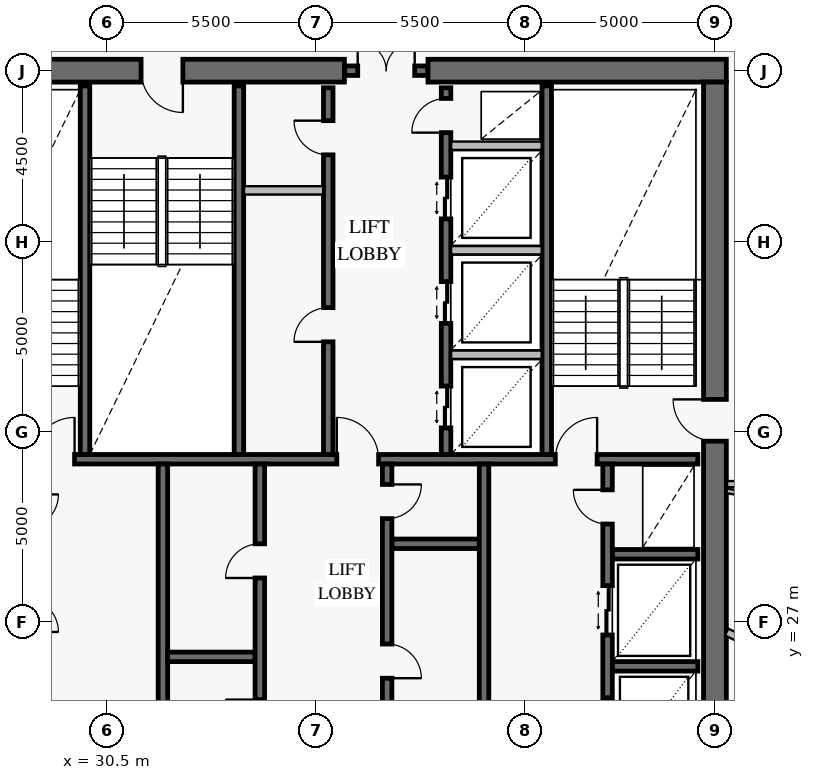
"""IFC4 building model, lengths in metres.
Left out: names, types, materials, properties, quantities, classifications, styles, units other than length and angle.
Written with IfcOpenShell. Run it as: python <this file> out.ifc"""

import sys

from ifc_helpers import new_model, si_unit, direction, frame, frame_2d, origin, place, context, subcontext, project, spatial, rectangle, extrude, element, fill, save


model = new_model("IFC4")
c1 = context("Model", 3, precision=1e-05, world=origin(), true_north=direction((0.0, 1.0)))
c2 = subcontext(c1, "Body", "Model", "MODEL_VIEW")
j1 = project(units=[si_unit("LENGTHUNIT", "METRE"), si_unit("PLANEANGLEUNIT", "RADIAN")], contexts=[c1])
p1 = place(None, origin())
s1 = spatial("IfcSite", under=j1, at=p1, CompositionType="ELEMENT")
p2 = place(p1, origin())
s2 = spatial("IfcBuilding", under=s1, at=p2, CompositionType="ELEMENT")
p3 = place(p2, frame((0.0, 0.0, 295.8)))
s3 = spatial("IfcBuildingStorey", under=s2, at=p3, CompositionType="ELEMENT", Elevation=295.8)
p4 = place(p3, frame((46.8, 41.5, 0.0), z_axis=(0.0, 0.0, 1.0), x_axis=(-1.0, 0.0, 0.0)))
e1 = element("IfcWall", 1, at=p4, inside=s3, PredefinedType="SHEAR", context=c2, shape_type="SweptSolid", body=[
    extrude(rectangle(XDim=7.85, YDim=0.6, at=frame_2d((3.925, 0.0))), origin(), (0.0, 0.0, 1.0), 3.8),
])
p5 = place(p3, frame((36.75, 41.5, 0.0), z_axis=(0.0, 0.0, 1.0), x_axis=(-1.0, 0.0, 0.0)))
e2 = element("IfcWall", 2, at=p5, inside=s3, PredefinedType="SHEAR", context=c2, shape_type="SweptSolid", body=[
    extrude(rectangle(XDim=11.55, YDim=0.6, at=frame_2d((5.775, 0.0))), origin(), (0.0, 0.0, 1.0), 3.8),
])
p6 = place(p5, frame((4.25, 0.0, 0.0)))
e3 = element("IfcOpeningElement", 3, at=p6, cuts=e2, PredefinedType="OPENING", context=c2, shape_type="SweptSolid", body=[
    extrude(rectangle(XDim=1.1, YDim=2.15, at=frame_2d((0.55, 1.075))), frame((0.0, 0.312, 0.0), z_axis=(0.0, -1.0, 0.0), x_axis=(1.0, 0.0, 0.0)), (0.0, 0.0, 1.0), 0.624),
])
p7 = place(p3, frame((46.5, 22.8, 0.0), z_axis=(0.0, 0.0, 1.0), x_axis=(0.0, 1.0, 0.0)))
e4 = element("IfcWall", 4, at=p7, inside=s3, PredefinedType="SHEAR", context=c2, shape_type="SweptSolid", body=[
    extrude(rectangle(XDim=18.4, YDim=0.6, at=frame_2d((9.2, 0.0))), origin(), (0.0, 0.0, 1.0), 3.8),
])
p8 = place(p7, frame((8.95, 0.0, 0.0)))
e5 = element("IfcOpeningElement", 5, at=p8, cuts=e4, PredefinedType="OPENING", context=c2, shape_type="SweptSolid", body=[
    extrude(rectangle(XDim=1.1, YDim=2.15, at=frame_2d((0.55, 1.075))), frame((0.0, 0.312, 0.0), z_axis=(0.0, -1.0, 0.0), x_axis=(1.0, 0.0, 0.0)), (0.0, 0.0, 1.0), 0.624),
])
p9 = place(p3, frame((36.76, 41.5, 0.0), z_axis=(0.0, 0.0, 1.0), x_axis=(1.0, 0.0, 0.0)))
e6 = element("IfcWall", 6, at=p9, inside=s3, PredefinedType="SOLIDWALL", context=c2, shape_type="SweptSolid", body=[
    extrude(rectangle(XDim=2.18, YDim=0.25, at=frame_2d((1.09, 0.0))), origin(), (0.0, 0.0, 1.0), 3.8),
])
p10 = place(p9, frame((0.34, 0.0, 0.0)))
e7 = element("IfcOpeningElement", 7, at=p10, cuts=e6, PredefinedType="OPENING", context=c2, shape_type="SweptSolid", body=[
    extrude(rectangle(XDim=1.5, YDim=2.15, at=frame_2d((0.75, 1.075))), frame((0.0, 0.137, 0.0), z_axis=(0.0, -1.0, 0.0), x_axis=(1.0, 0.0, 0.0)), (0.0, 0.0, 1.0), 0.274),
])
p11 = place(p3, frame((25.95, 31.275, 0.0), z_axis=(0.0, 0.0, 1.0), x_axis=(1.0, 0.0, 0.0)))
e8 = element("IfcWall", 8, at=p11, inside=s3, PredefinedType="SOLIDWALL", context=c2, shape_type="SweptSolid", body=[
    extrude(rectangle(XDim=20.1, YDim=0.25, at=frame_2d((10.05, 0.0))), origin(), (0.0, 0.0, 1.0), 3.8),
])
p12 = place(p11, frame((2.6, 0.0, 0.0)))
e9 = element("IfcOpeningElement", 9, at=p12, cuts=e8, PredefinedType="OPENING", context=c2, shape_type="SweptSolid", body=[
    extrude(rectangle(XDim=1.1, YDim=2.15, at=frame_2d((0.55, 1.075))), frame((0.0, 0.137, 0.0), z_axis=(0.0, -1.0, 0.0), x_axis=(1.0, 0.0, 0.0)), (0.0, 0.0, 1.0), 0.274),
])
p13 = place(p11, frame((10.6, 0.0, 0.0)))
e10 = element("IfcOpeningElement", 10, at=p13, cuts=e8, PredefinedType="OPENING", context=c2, shape_type="SweptSolid", body=[
    extrude(rectangle(XDim=1.1, YDim=2.15, at=frame_2d((0.55, 1.075))), frame((0.0, 0.137, 0.0), z_axis=(0.0, -1.0, 0.0), x_axis=(1.0, 0.0, 0.0)), (0.0, 0.0, 1.0), 0.274),
])
p14 = place(p11, frame((16.35, 0.0, 0.0)))
e11 = element("IfcOpeningElement", 11, at=p14, cuts=e8, PredefinedType="OPENING", context=c2, shape_type="SweptSolid", body=[
    extrude(rectangle(XDim=1.1, YDim=2.15, at=frame_2d((0.55, 1.075))), frame((0.0, 0.137, 0.0), z_axis=(0.0, -1.0, 0.0), x_axis=(1.0, 0.0, 0.0)), (0.0, 0.0, 1.0), 0.274),
])
for number, where, z_axis, x_axis in (
    (12, (29.925, 31.4, 0.0), (0.0, 0.0, 1.0), (0.0, 1.0, 0.0)),
    (13, (33.975, 31.4, 0.0), (0.0, 0.0, 1.0), (0.0, 1.0, 0.0)),
    (14, (42.075, 31.4, 0.0), (0.0, 0.0, 1.0), (0.0, 1.0, 0.0)),
):
    element("IfcWall", number, at=place(p3, frame(where, z_axis=z_axis, x_axis=x_axis)), inside=s3, PredefinedType="SOLIDWALL", context=c2, shape_type="SweptSolid", body=[
        extrude(rectangle(XDim=9.7, YDim=0.25, at=frame_2d((4.85, 0.0))), origin(), (0.0, 0.0, 1.0), 3.8),
    ])
p15 = place(p3, frame((36.325, 31.4, 0.0), z_axis=(0.0, 0.0, 1.0), x_axis=(0.0, 1.0, 0.0)))
e15 = element("IfcWall", 15, at=p15, inside=s3, PredefinedType="SOLIDWALL", context=c2, shape_type="SweptSolid", body=[
    extrude(rectangle(XDim=9.65, YDim=0.25, at=frame_2d((4.825, 0.0))), origin(), (0.0, 0.0, 1.0), 3.8),
])
p16 = place(p15, frame((2.965, 0.0, 0.0)))
e16 = element("IfcOpeningElement", 16, at=p16, cuts=e15, PredefinedType="OPENING", context=c2, shape_type="SweptSolid", body=[
    extrude(rectangle(XDim=0.9, YDim=2.1, at=frame_2d((0.45, 1.05))), frame((0.0, 0.137, 0.0), z_axis=(0.0, -1.0, 0.0), x_axis=(1.0, 0.0, 0.0)), (0.0, 0.0, 1.0), 0.274),
])
p17 = place(p15, frame((7.885, 0.0, 0.0)))
e17 = element("IfcOpeningElement", 17, at=p17, cuts=e15, PredefinedType="OPENING", context=c2, shape_type="SweptSolid", body=[
    extrude(rectangle(XDim=0.9, YDim=2.1, at=frame_2d((0.45, 1.05))), frame((0.0, 0.137, 0.0), z_axis=(0.0, -1.0, 0.0), x_axis=(1.0, 0.0, 0.0)), (0.0, 0.0, 1.0), 0.274),
])
p18 = place(p3, frame((39.425, 31.4, 0.0), z_axis=(0.0, 0.0, 1.0), x_axis=(0.0, 1.0, 0.0)))
e18 = element("IfcWall", 18, at=p18, inside=s3, PredefinedType="SOLIDWALL", context=c2, shape_type="SweptSolid", body=[
    extrude(rectangle(XDim=9.65, YDim=0.25, at=frame_2d((4.825, 0.0))), origin(), (0.0, 0.0, 1.0), 3.8),
])
p19 = place(p18, frame((0.7, 0.0, 0.0)))
e19 = element("IfcOpeningElement", 19, at=p19, cuts=e18, PredefinedType="OPENING", context=c2, shape_type="SweptSolid", body=[
    extrude(rectangle(XDim=1.1, YDim=2.2, at=frame_2d((0.55, 1.1))), frame((0.0, 0.137, 0.0), z_axis=(0.0, -1.0, 0.0), x_axis=(1.0, 0.0, 0.0)), (0.0, 0.0, 1.0), 0.274),
])
p20 = place(p18, frame((3.45, 0.0, 0.0)))
e20 = element("IfcOpeningElement", 20, at=p20, cuts=e18, PredefinedType="OPENING", context=c2, shape_type="SweptSolid", body=[
    extrude(rectangle(XDim=1.1, YDim=2.2, at=frame_2d((0.55, 1.1))), frame((0.0, 0.137, 0.0), z_axis=(0.0, -1.0, 0.0), x_axis=(1.0, 0.0, 0.0)), (0.0, 0.0, 1.0), 0.274),
])
p21 = place(p18, frame((6.2, 0.0, 0.0)))
e21 = element("IfcOpeningElement", 21, at=p21, cuts=e18, PredefinedType="OPENING", context=c2, shape_type="SweptSolid", body=[
    extrude(rectangle(XDim=1.1, YDim=2.2, at=frame_2d((0.55, 1.1))), frame((0.0, 0.137, 0.0), z_axis=(0.0, -1.0, 0.0), x_axis=(1.0, 0.0, 0.0)), (0.0, 0.0, 1.0), 0.274),
])
p22 = place(p18, frame((8.47, 0.0, 0.0)))
e22 = element("IfcOpeningElement", 22, at=p22, cuts=e18, PredefinedType="OPENING", context=c2, shape_type="SweptSolid", body=[
    extrude(rectangle(XDim=0.9, YDim=2.1, at=frame_2d((0.45, 1.05))), frame((0.0, 0.137, 0.0), z_axis=(0.0, -1.0, 0.0), x_axis=(1.0, 0.0, 0.0)), (0.0, 0.0, 1.0), 0.274),
])
p23 = place(p3, frame((31.975, 22.95, 0.0), z_axis=(0.0, 0.0, 1.0), x_axis=(0.0, 1.0, 0.0)))
e23 = element("IfcWall", 23, at=p23, inside=s3, PredefinedType="SOLIDWALL", context=c2, shape_type="SweptSolid", body=[
    extrude(rectangle(XDim=8.2, YDim=0.25, at=frame_2d((4.1, 0.0))), origin(), (0.0, 0.0, 1.0), 3.8),
])
p24 = place(p3, frame((32.1, 26.075, 0.0), z_axis=(0.0, 0.0, 1.0), x_axis=(1.0, 0.0, 0.0)))
e24 = element("IfcWall", 24, at=p24, inside=s3, PredefinedType="SOLIDWALL", context=c2, shape_type="SweptSolid", body=[
    extrude(rectangle(XDim=2.3, YDim=0.25, at=frame_2d((1.15, 0.0))), origin(), (0.0, 0.0, 1.0), 3.8),
])
p25 = place(p3, frame((34.525, 22.95, 0.0), z_axis=(0.0, 0.0, 1.0), x_axis=(0.0, 1.0, 0.0)))
e25 = element("IfcWall", 25, at=p25, inside=s3, PredefinedType="SOLIDWALL", context=c2, shape_type="SweptSolid", body=[
    extrude(rectangle(XDim=8.2, YDim=0.25, at=frame_2d((4.1, 0.0))), origin(), (0.0, 0.0, 1.0), 3.8),
])
p26 = place(p25, frame((1.1, 0.0, 0.0)))
e26 = element("IfcOpeningElement", 26, at=p26, cuts=e25, PredefinedType="OPENING", context=c2, shape_type="SweptSolid", body=[
    extrude(rectangle(XDim=0.9, YDim=2.1, at=frame_2d((0.45, 1.05))), frame((0.0, 0.137, 0.0), z_axis=(0.0, -1.0, 0.0), x_axis=(1.0, 0.0, 0.0)), (0.0, 0.0, 1.0), 0.274),
])
p27 = place(p25, frame((5.2, 0.0, 0.0)))
e27 = element("IfcOpeningElement", 27, at=p27, cuts=e25, PredefinedType="OPENING", context=c2, shape_type="SweptSolid", body=[
    extrude(rectangle(XDim=0.9, YDim=2.1, at=frame_2d((0.45, 1.05))), frame((0.0, 0.137, 0.0), z_axis=(0.0, -1.0, 0.0), x_axis=(1.0, 0.0, 0.0)), (0.0, 0.0, 1.0), 0.274),
])
p28 = place(p3, frame((38.0, 29.05, 0.0), z_axis=(0.0, 0.0, 1.0), x_axis=(1.0, 0.0, 0.0)))
e28 = element("IfcWall", 28, at=p28, inside=s3, PredefinedType="SOLIDWALL", context=c2, shape_type="SweptSolid", body=[
    extrude(rectangle(XDim=2.3, YDim=0.25, at=frame_2d((1.15, 0.0))), origin(), (0.0, 0.0, 1.0), 3.8),
])
p29 = place(p3, frame((37.875, 22.95, 0.0), z_axis=(0.0, 0.0, 1.0), x_axis=(0.0, 1.0, 0.0)))
e29 = element("IfcWall", 29, at=p29, inside=s3, PredefinedType="SOLIDWALL", context=c2, shape_type="SweptSolid", body=[
    extrude(rectangle(XDim=8.2, YDim=0.25, at=frame_2d((4.1, 0.0))), origin(), (0.0, 0.0, 1.0), 3.8),
])
p30 = place(p29, frame((2.562, 0.0, 0.0)))
e30 = element("IfcOpeningElement", 30, at=p30, cuts=e29, PredefinedType="OPENING", context=c2, shape_type="SweptSolid", body=[
    extrude(rectangle(XDim=0.9, YDim=2.1, at=frame_2d((0.45, 1.05))), frame((0.0, 0.137, 0.0), z_axis=(0.0, -1.0, 0.0), x_axis=(1.0, 0.0, 0.0)), (0.0, 0.0, 1.0), 0.274),
])
p31 = place(p29, frame((6.762, 0.0, 0.0)))
e31 = element("IfcOpeningElement", 31, at=p31, cuts=e29, PredefinedType="OPENING", context=c2, shape_type="SweptSolid", body=[
    extrude(rectangle(XDim=0.9, YDim=2.1, at=frame_2d((0.45, 1.05))), frame((0.0, 0.137, 0.0), z_axis=(0.0, -1.0, 0.0), x_axis=(1.0, 0.0, 0.0)), (0.0, 0.0, 1.0), 0.274),
])
p32 = place(p3, frame((40.425, 22.95, 0.0), z_axis=(0.0, 0.0, 1.0), x_axis=(0.0, 1.0, 0.0)))
e32 = element("IfcWall", 32, at=p32, inside=s3, PredefinedType="SOLIDWALL", context=c2, shape_type="SweptSolid", body=[
    extrude(rectangle(XDim=8.2, YDim=0.25, at=frame_2d((4.1, 0.0))), origin(), (0.0, 0.0, 1.0), 3.8),
])
for number, where, z_axis, x_axis in (
    (33, (43.8, 25.825, 0.0), (0.0, 0.0, 1.0), (1.0, 0.0, 0.0)),
    (34, (43.8, 28.775, 0.0), (0.0, 0.0, 1.0), (1.0, 0.0, 0.0)),
):
    element("IfcWall", number, at=place(p3, frame(where, z_axis=z_axis, x_axis=x_axis)), inside=s3, PredefinedType="SOLIDWALL", context=c2, shape_type="SweptSolid", body=[
        extrude(rectangle(XDim=2.25, YDim=0.25, at=frame_2d((1.125, 0.0))), origin(), (0.0, 0.0, 1.0), 3.8),
    ])
p33 = place(p3, frame((43.675, 22.95, 0.0), z_axis=(0.0, 0.0, 1.0), x_axis=(0.0, 1.0, 0.0)))
e35 = element("IfcWall", 35, at=p33, inside=s3, PredefinedType="SOLIDWALL", context=c2, shape_type="SweptSolid", body=[
    extrude(rectangle(XDim=8.2, YDim=0.25, at=frame_2d((4.1, 0.0))), origin(), (0.0, 0.0, 1.0), 3.8),
])
p34 = place(p33, frame((0.75, 0.0, 0.0)))
e36 = element("IfcOpeningElement", 36, at=p34, cuts=e35, PredefinedType="OPENING", context=c2, shape_type="SweptSolid", body=[
    extrude(rectangle(XDim=1.3, YDim=2.3, at=frame_2d((0.65, 1.15))), frame((0.0, 0.137, 0.0), z_axis=(0.0, -1.0, 0.0), x_axis=(1.0, 0.0, 0.0)), (0.0, 0.0, 1.0), 0.274),
])
p35 = place(p33, frame((3.7, 0.0, 0.0)))
e37 = element("IfcOpeningElement", 37, at=p35, cuts=e35, PredefinedType="OPENING", context=c2, shape_type="SweptSolid", body=[
    extrude(rectangle(XDim=1.3, YDim=2.3, at=frame_2d((0.65, 1.15))), frame((0.0, 0.137, 0.0), z_axis=(0.0, -1.0, 0.0), x_axis=(1.0, 0.0, 0.0)), (0.0, 0.0, 1.0), 0.274),
])
p36 = place(p33, frame((6.62, 0.0, 0.0)))
e38 = element("IfcOpeningElement", 38, at=p36, cuts=e35, PredefinedType="OPENING", context=c2, shape_type="SweptSolid", body=[
    extrude(rectangle(XDim=0.9, YDim=2.1, at=frame_2d((0.45, 1.05))), frame((0.0, 0.137, 0.0), z_axis=(0.0, -1.0, 0.0), x_axis=(1.0, 0.0, 0.0)), (0.0, 0.0, 1.0), 0.274),
])
p37 = place(p3, frame((34.108, 38.35, 0.0), z_axis=(0.0, 0.0, 1.0), x_axis=(1.0, 0.0, 0.0)))
e39 = element("IfcWall", 39, at=p37, inside=s3, PredefinedType="PARTITIONING", context=c2, shape_type="SweptSolid", body=[
    extrude(rectangle(XDim=2.084, YDim=0.22, at=frame_2d((1.042, 0.0))), origin(), (0.0, 0.0, 1.0), 3.55),
])
for number, where, z_axis, x_axis in (
    (40, (39.558, 34.025, 0.0), (0.0, 0.0, 1.0), (1.0, 0.0, 0.0)),
    (41, (39.558, 36.775, 0.0), (0.0, 0.0, 1.0), (1.0, 0.0, 0.0)),
    (42, (39.558, 39.525, 0.0), (0.0, 0.0, 1.0), (1.0, 0.0, 0.0)),
):
    element("IfcWall", number, at=place(p3, frame(where, z_axis=z_axis, x_axis=x_axis)), inside=s3, PredefinedType="PARTITIONING", context=c2, shape_type="SweptSolid", body=[
        extrude(rectangle(XDim=2.384, YDim=0.22, at=frame_2d((1.192, 0.0))), origin(), (0.0, 0.0, 1.0), 3.55),
    ])
p38 = place(p3, frame((46.808, 26.729, 0.0), z_axis=(0.0, 0.0, 1.0), x_axis=(0.89879587414, -0.438367399141, 0.0)))
e43 = element("IfcWall", 43, at=p38, inside=s3, PredefinedType="PARTITIONING", context=c2, shape_type="SweptSolid", body=[
    extrude(rectangle(XDim=13.601, YDim=0.2, at=frame_2d((6.8, 0.0))), origin(), (0.0, 0.0, 1.0), 2.93),
])
p39 = place(p3, frame((46.808, 30.44, 0.0), z_axis=(0.0, 0.0, 1.0), x_axis=(0.989743218854, -0.142857833988, 0.0)))
e44 = element("IfcWall", 44, at=p39, inside=s3, PredefinedType="PARTITIONING", context=c2, shape_type="SweptSolid", body=[
    extrude(rectangle(XDim=3.64, YDim=0.12, at=frame_2d((1.82, 0.0))), origin(), (0.0, 0.0, 1.0), 3.55),
])
p40 = place(p3, frame((46.82, 30.62, 0.0), z_axis=(0.0, 0.0, 1.0), x_axis=(1.0, 0.0, 0.0)))
e45 = element("IfcWall", 45, at=p40, inside=s3, PredefinedType="PARTITIONING", context=c2, shape_type="SweptSolid", body=[
    extrude(rectangle(XDim=2.03, YDim=0.16, at=frame_2d((1.015, 0.0))), origin(), (0.0, 0.0, 1.0), 3.55),
])
p41 = place(p8, origin())
e46 = element("IfcDoor", 46, at=p41, inside=s3, OperationType="SINGLE_SWING_RIGHT", PredefinedType="USERDEFINED", context=c2, shape_type="SweptSolid", body=[
    extrude(rectangle(XDim=1.1, YDim=2.15, at=frame_2d((0.55, 1.075))), frame((0.0, 0.025, 0.0), z_axis=(0.0, -1.0, 0.0), x_axis=(1.0, 0.0, 0.0)), (0.0, 0.0, 1.0), 0.05),
])
fill(e5, e46)
p42 = place(p6, origin())
e47 = element("IfcDoor", 47, at=p42, inside=s3, OperationType="SINGLE_SWING_LEFT", PredefinedType="USERDEFINED", context=c2, shape_type="SweptSolid", body=[
    extrude(rectangle(XDim=1.1, YDim=2.15, at=frame_2d((0.55, 1.075))), frame((0.0, 0.025, 0.0), z_axis=(0.0, -1.0, 0.0), x_axis=(1.0, 0.0, 0.0)), (0.0, 0.0, 1.0), 0.05),
])
fill(e3, e47)
p43 = place(p10, origin())
e48 = element("IfcDoor", 48, at=p43, inside=s3, OperationType="DOUBLE_DOOR_SINGLE_SWING", PredefinedType="DOOR", context=c2, shape_type="SweptSolid", body=[
    extrude(rectangle(XDim=1.5, YDim=2.15, at=frame_2d((0.75, 1.075))), frame((0.0, 0.025, 0.0), z_axis=(0.0, -1.0, 0.0), x_axis=(1.0, 0.0, 0.0)), (0.0, 0.0, 1.0), 0.05),
])
fill(e7, e48)
p44 = place(p12, origin())
e49 = element("IfcDoor", 49, at=p44, inside=s3, OperationType="SINGLE_SWING_RIGHT", PredefinedType="USERDEFINED", context=c2, shape_type="SweptSolid", body=[
    extrude(rectangle(XDim=1.1, YDim=2.15, at=frame_2d((0.55, 1.075))), frame((0.0, 0.025, 0.0), z_axis=(0.0, -1.0, 0.0), x_axis=(1.0, 0.0, 0.0)), (0.0, 0.0, 1.0), 0.05),
])
fill(e9, e49)
p45 = place(p13, origin())
e50 = element("IfcDoor", 50, at=p45, inside=s3, OperationType="SINGLE_SWING_LEFT", PredefinedType="USERDEFINED", context=c2, shape_type="SweptSolid", body=[
    extrude(rectangle(XDim=1.1, YDim=2.15, at=frame_2d((0.55, 1.075))), frame((0.0, 0.025, 0.0), z_axis=(0.0, -1.0, 0.0), x_axis=(1.0, 0.0, 0.0)), (0.0, 0.0, 1.0), 0.05),
])
fill(e10, e50)
p46 = place(p14, origin())
e51 = element("IfcDoor", 51, at=p46, inside=s3, OperationType="SINGLE_SWING_RIGHT", PredefinedType="USERDEFINED", context=c2, shape_type="SweptSolid", body=[
    extrude(rectangle(XDim=1.1, YDim=2.15, at=frame_2d((0.55, 1.075))), frame((0.0, 0.025, 0.0), z_axis=(0.0, -1.0, 0.0), x_axis=(1.0, 0.0, 0.0)), (0.0, 0.0, 1.0), 0.05),
])
fill(e11, e51)
p47 = place(p16, origin())
e52 = element("IfcDoor", 52, at=p47, inside=s3, OperationType="SINGLE_SWING_LEFT", PredefinedType="DOOR", context=c2, shape_type="SweptSolid", body=[
    extrude(rectangle(XDim=0.9, YDim=2.1, at=frame_2d((0.45, 1.05))), frame((0.0, 0.025, 0.0), z_axis=(0.0, -1.0, 0.0), x_axis=(1.0, 0.0, 0.0)), (0.0, 0.0, 1.0), 0.05),
])
fill(e16, e52)
p48 = place(p17, origin())
e53 = element("IfcDoor", 53, at=p48, inside=s3, OperationType="SINGLE_SWING_RIGHT", PredefinedType="DOOR", context=c2, shape_type="SweptSolid", body=[
    extrude(rectangle(XDim=0.9, YDim=2.1, at=frame_2d((0.45, 1.05))), frame((0.0, 0.025, 0.0), z_axis=(0.0, -1.0, 0.0), x_axis=(1.0, 0.0, 0.0)), (0.0, 0.0, 1.0), 0.05),
])
fill(e17, e53)
p49 = place(p19, origin())
e54 = element("IfcDoor", 54, at=p49, inside=s3, OperationType="DOUBLE_DOOR_SLIDING", PredefinedType="DOOR", context=c2, shape_type="SweptSolid", body=[
    extrude(rectangle(XDim=1.1, YDim=2.2, at=frame_2d((0.55, 1.1))), frame((0.0, 0.025, 0.0), z_axis=(0.0, -1.0, 0.0), x_axis=(1.0, 0.0, 0.0)), (0.0, 0.0, 1.0), 0.05),
])
fill(e19, e54)
p50 = place(p20, origin())
e55 = element("IfcDoor", 55, at=p50, inside=s3, OperationType="DOUBLE_DOOR_SLIDING", PredefinedType="DOOR", context=c2, shape_type="SweptSolid", body=[
    extrude(rectangle(XDim=1.1, YDim=2.2, at=frame_2d((0.55, 1.1))), frame((0.0, 0.025, 0.0), z_axis=(0.0, -1.0, 0.0), x_axis=(1.0, 0.0, 0.0)), (0.0, 0.0, 1.0), 0.05),
])
fill(e20, e55)
p51 = place(p21, origin())
e56 = element("IfcDoor", 56, at=p51, inside=s3, OperationType="DOUBLE_DOOR_SLIDING", PredefinedType="DOOR", context=c2, shape_type="SweptSolid", body=[
    extrude(rectangle(XDim=1.1, YDim=2.2, at=frame_2d((0.55, 1.1))), frame((0.0, 0.025, 0.0), z_axis=(0.0, -1.0, 0.0), x_axis=(1.0, 0.0, 0.0)), (0.0, 0.0, 1.0), 0.05),
])
fill(e21, e56)
p52 = place(p22, origin())
e57 = element("IfcDoor", 57, at=p52, inside=s3, OperationType="SINGLE_SWING_LEFT", PredefinedType="DOOR", context=c2, shape_type="SweptSolid", body=[
    extrude(rectangle(XDim=0.9, YDim=2.1, at=frame_2d((0.45, 1.05))), frame((0.0, 0.025, 0.0), z_axis=(0.0, -1.0, 0.0), x_axis=(1.0, 0.0, 0.0)), (0.0, 0.0, 1.0), 0.05),
])
fill(e22, e57)
p53 = place(p27, origin())
e58 = element("IfcDoor", 58, at=p53, inside=s3, OperationType="SINGLE_SWING_LEFT", PredefinedType="DOOR", context=c2, shape_type="SweptSolid", body=[
    extrude(rectangle(XDim=0.9, YDim=2.1, at=frame_2d((0.45, 1.05))), frame((0.0, 0.025, 0.0), z_axis=(0.0, -1.0, 0.0), x_axis=(1.0, 0.0, 0.0)), (0.0, 0.0, 1.0), 0.05),
])
fill(e27, e58)
p54 = place(p30, frame((0.9, 0.0, 0.0), z_axis=(0.0, 0.0, 1.0), x_axis=(-1.0, 0.0, 0.0)))
e59 = element("IfcDoor", 59, at=p54, inside=s3, OperationType="SINGLE_SWING_RIGHT", PredefinedType="DOOR", context=c2, shape_type="SweptSolid", body=[
    extrude(rectangle(XDim=0.9, YDim=2.1, at=frame_2d((0.45, 1.05))), frame((0.0, 0.025, 0.0), z_axis=(0.0, -1.0, 0.0), x_axis=(1.0, 0.0, 0.0)), (0.0, 0.0, 1.0), 0.05),
])
fill(e30, e59)
p55 = place(p31, frame((0.9, 0.0, 0.0), z_axis=(0.0, 0.0, 1.0), x_axis=(-1.0, 0.0, 0.0)))
e60 = element("IfcDoor", 60, at=p55, inside=s3, OperationType="SINGLE_SWING_LEFT", PredefinedType="DOOR", context=c2, shape_type="SweptSolid", body=[
    extrude(rectangle(XDim=0.9, YDim=2.1, at=frame_2d((0.45, 1.05))), frame((0.0, 0.025, 0.0), z_axis=(0.0, -1.0, 0.0), x_axis=(1.0, 0.0, 0.0)), (0.0, 0.0, 1.0), 0.05),
])
fill(e31, e60)
p56 = place(p34, origin())
e61 = element("IfcDoor", 61, at=p56, inside=s3, OperationType="DOUBLE_DOOR_SLIDING", PredefinedType="DOOR", context=c2, shape_type="SweptSolid", body=[
    extrude(rectangle(XDim=1.3, YDim=2.3, at=frame_2d((0.65, 1.15))), frame((0.0, 0.025, 0.0), z_axis=(0.0, -1.0, 0.0), x_axis=(1.0, 0.0, 0.0)), (0.0, 0.0, 1.0), 0.05),
])
fill(e36, e61)
p57 = place(p35, origin())
e62 = element("IfcDoor", 62, at=p57, inside=s3, OperationType="DOUBLE_DOOR_SLIDING", PredefinedType="DOOR", context=c2, shape_type="SweptSolid", body=[
    extrude(rectangle(XDim=1.3, YDim=2.3, at=frame_2d((0.65, 1.15))), frame((0.0, 0.025, 0.0), z_axis=(0.0, -1.0, 0.0), x_axis=(1.0, 0.0, 0.0)), (0.0, 0.0, 1.0), 0.05),
])
fill(e37, e62)
p58 = place(p36, origin())
e63 = element("IfcDoor", 63, at=p58, inside=s3, OperationType="SINGLE_SWING_RIGHT", PredefinedType="DOOR", context=c2, shape_type="SweptSolid", body=[
    extrude(rectangle(XDim=0.9, YDim=2.1, at=frame_2d((0.45, 1.05))), frame((0.0, 0.025, 0.0), z_axis=(0.0, -1.0, 0.0), x_axis=(1.0, 0.0, 0.0)), (0.0, 0.0, 1.0), 0.05),
])
fill(e38, e63)
save(model, sys.argv[1])
